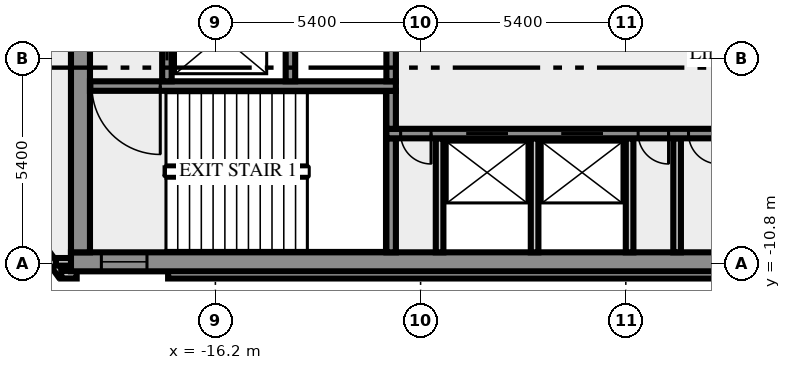
"""IFC4 building model, lengths in metres.
Left out: names, types, materials, properties, quantities, classifications, styles, units other than length and angle.
Written with IfcOpenShell. Run it as: python <this file> out.ifc"""

import sys

from ifc_helpers import new_model, si_unit, direction, frame, frame_2d, origin, place, context, subcontext, project, spatial, rectangle, extrude, element, fill, save


model = new_model("IFC4")
c1 = context("Model", 3, precision=1e-05, world=origin(), true_north=direction((0.0, 1.0)))
c2 = subcontext(c1, "Body", "Model", "MODEL_VIEW")
j1 = project(units=[si_unit("LENGTHUNIT", "METRE"), si_unit("PLANEANGLEUNIT", "RADIAN")], contexts=[c1])
p1 = place(None, origin())
s1 = spatial("IfcSite", under=j1, at=p1, CompositionType="ELEMENT")
p2 = place(p1, origin())
s2 = spatial("IfcBuilding", under=s1, at=p2, CompositionType="ELEMENT")
p3 = place(p2, frame((0.0, 0.0, 311.0)))
s3 = spatial("IfcBuildingStorey", under=s2, at=p3, CompositionType="ELEMENT", Elevation=311.0)
p4 = place(p3, frame((-21.833, -8.909, 0.0), z_axis=(0.0, 0.0, 1.0), x_axis=(0.587766567315, -0.809030569476, 0.0)))
e1 = element("IfcWall", 1, at=p4, inside=s3, PredefinedType="SOLIDWALL", context=c2, shape_type="SweptSolid", body=[
    extrude(rectangle(XDim=2.688, YDim=0.2, at=frame_2d((1.344, 0.0))), origin(), (0.0, 0.0, 1.0), 3.65),
])
p5 = place(p3, frame((-20.256, -11.088, 0.0), z_axis=(0.0, 0.0, 1.0), x_axis=(1.0, 0.0, 0.0)))
e2 = element("IfcWall", 2, at=p5, inside=s3, PredefinedType="SOLIDWALL", context=c2, shape_type="SweptSolid", body=[
    extrude(rectangle(XDim=0.406, YDim=0.2, at=frame_2d((0.203, 0.0))), origin(), (0.0, 0.0, 1.0), 3.65),
])
p6 = place(p3, frame((-17.444, -11.088, 0.0), z_axis=(0.0, 0.0, 1.0), x_axis=(1.0, 0.0, 0.0)))
e3 = element("IfcWall", 3, at=p6, inside=s3, PredefinedType="SOLIDWALL", context=c2, shape_type="SweptSolid", body=[
    extrude(rectangle(XDim=34.888, YDim=0.2, at=frame_2d((17.444, 0.0))), origin(), (0.0, 0.0, 1.0), 3.65),
])
p7 = place(p3, frame((-19.98, -10.75, 0.0), z_axis=(0.0, 0.0, 1.0), x_axis=(-1.0, 0.0, 0.0)))
e4 = element("IfcWall", 4, at=p7, inside=s3, PredefinedType="SOLIDWALL", context=c2, shape_type="SweptSolid", body=[
    extrude(rectangle(XDim=0.417, YDim=0.2, at=frame_2d((0.208, 0.0))), origin(), (0.0, 0.0, 1.0), 3.65),
])
p8 = place(p3, frame((-20.0, -10.75, 0.0), z_axis=(0.0, 0.0, 1.0), x_axis=(1.0, 0.0, 0.0)))
e5 = element("IfcWall", 5, at=p8, inside=s3, PredefinedType="SHEAR", context=c2, shape_type="SweptSolid", body=[
    extrude(rectangle(XDim=40.0, YDim=0.5, at=frame_2d((20.0, 0.0))), origin(), (0.0, 0.0, 1.0), 3.65),
])
p9 = place(p8, frame((0.8, 0.0, 1.0)))
e6 = element("IfcOpeningElement", 6, at=p9, cuts=e5, PredefinedType="OPENING", context=c2, shape_type="SweptSolid", body=[
    extrude(rectangle(XDim=1.2, YDim=1.2, at=frame_2d((0.6, 0.6))), frame((0.0, 0.26, 0.0), z_axis=(0.0, -1.0, 0.0), x_axis=(1.0, 0.0, 0.0)), (0.0, 0.0, 1.0), 0.52),
])
p10 = place(p8, frame((38.0, 0.0, 1.0)))
e7 = element("IfcOpeningElement", 7, at=p10, cuts=e5, PredefinedType="OPENING", context=c2, shape_type="SweptSolid", body=[
    extrude(rectangle(XDim=1.2, YDim=1.2, at=frame_2d((0.6, 0.6))), frame((0.0, 0.26, 0.0), z_axis=(0.0, -1.0, 0.0), x_axis=(1.0, 0.0, 0.0)), (0.0, 0.0, 1.0), 0.52),
])
p11 = place(p3, frame((-19.75, -10.5, 0.0), z_axis=(0.0, 0.0, 1.0), x_axis=(0.0, 1.0, 0.0)))
e8 = element("IfcWall", 8, at=p11, inside=s3, PredefinedType="SHEAR", context=c2, shape_type="SweptSolid", body=[
    extrude(rectangle(XDim=8.8, YDim=0.5, at=frame_2d((4.4, 0.0))), origin(), (0.0, 0.0, 1.0), 3.65),
])
p12 = place(p3, frame((-11.575, -10.5, 0.0), z_axis=(0.0, 0.0, 1.0), x_axis=(0.0, 1.0, 0.0)))
e9 = element("IfcWall", 9, at=p12, inside=s3, PredefinedType="SHEAR", context=c2, shape_type="SweptSolid", body=[
    extrude(rectangle(XDim=3.0, YDim=0.25, at=frame_2d((1.5, 0.0))), origin(), (0.0, 0.0, 1.0), 3.65),
])
for number, where, z_axis, x_axis in (
    (10, (-10.3, -10.5, 0.0), (0.0, 0.0, 1.0), (0.0, 1.0, 0.0)),
    (11, (-7.8, -10.5, 0.0), (0.0, 0.0, 1.0), (0.0, 1.0, 0.0)),
    (12, (-5.3, -10.5, 0.0), (0.0, 0.0, 1.0), (0.0, 1.0, 0.0)),
    (13, (-4.05, -10.5, 0.0), (0.0, 0.0, 1.0), (0.0, 1.0, 0.0)),
):
    element("IfcWall", number, at=place(p3, frame(where, z_axis=z_axis, x_axis=x_axis)), inside=s3, PredefinedType="SOLIDWALL", context=c2, shape_type="SweptSolid", body=[
        extrude(rectangle(XDim=3.0, YDim=0.2, at=frame_2d((1.5, 0.0))), origin(), (0.0, 0.0, 1.0), 3.65),
    ])
p13 = place(p3, frame((11.7, -7.375, 0.0), z_axis=(0.0, 0.0, 1.0), x_axis=(-1.0, 0.0, 0.0)))
e14 = element("IfcWall", 14, at=p13, inside=s3, PredefinedType="SHEAR", context=c2, shape_type="SweptSolid", body=[
    extrude(rectangle(XDim=23.4, YDim=0.25, at=frame_2d((11.7, 0.0))), origin(), (0.0, 0.0, 1.0), 3.65),
])
p14 = place(p13, frame((22.225, 0.0, 0.0)))
e15 = element("IfcOpeningElement", 15, at=p14, cuts=e14, PredefinedType="OPENING", context=c2, shape_type="SweptSolid", body=[
    extrude(rectangle(XDim=0.8, YDim=2.1, at=frame_2d((0.4, 1.05))), frame((0.0, 0.135, 0.0), z_axis=(0.0, -1.0, 0.0), x_axis=(1.0, 0.0, 0.0)), (0.0, 0.0, 1.0), 0.27),
])
p15 = place(p13, frame((20.2, 0.0, 0.0)))
e16 = element("IfcOpeningElement", 16, at=p15, cuts=e14, PredefinedType="OPENING", context=c2, shape_type="SweptSolid", body=[
    extrude(rectangle(XDim=1.1, YDim=2.1, at=frame_2d((0.55, 1.05))), frame((0.0, 0.135, 0.0), z_axis=(0.0, -1.0, 0.0), x_axis=(1.0, 0.0, 0.0)), (0.0, 0.0, 1.0), 0.27),
])
p16 = place(p13, frame((17.7, 0.0, 0.0)))
e17 = element("IfcOpeningElement", 17, at=p16, cuts=e14, PredefinedType="OPENING", context=c2, shape_type="SweptSolid", body=[
    extrude(rectangle(XDim=1.1, YDim=2.1, at=frame_2d((0.55, 1.05))), frame((0.0, 0.135, 0.0), z_axis=(0.0, -1.0, 0.0), x_axis=(1.0, 0.0, 0.0)), (0.0, 0.0, 1.0), 0.27),
])
p17 = place(p13, frame((15.975, 0.0, 0.0)))
e18 = element("IfcOpeningElement", 18, at=p17, cuts=e14, PredefinedType="OPENING", context=c2, shape_type="SweptSolid", body=[
    extrude(rectangle(XDim=0.8, YDim=2.1, at=frame_2d((0.4, 1.05))), frame((0.0, 0.135, 0.0), z_axis=(0.0, -1.0, 0.0), x_axis=(1.0, 0.0, 0.0)), (0.0, 0.0, 1.0), 0.27),
])
p18 = place(p13, frame((14.65, 0.0, 0.0)))
e19 = element("IfcOpeningElement", 19, at=p18, cuts=e14, PredefinedType="OPENING", context=c2, shape_type="SweptSolid", body=[
    extrude(rectangle(XDim=0.8, YDim=2.1, at=frame_2d((0.4, 1.05))), frame((0.0, 0.135, 0.0), z_axis=(0.0, -1.0, 0.0), x_axis=(1.0, 0.0, 0.0)), (0.0, 0.0, 1.0), 0.27),
])
p19 = place(p13, frame((12.8, 0.0, 0.0)))
e20 = element("IfcOpeningElement", 20, at=p19, cuts=e14, PredefinedType="OPENING", context=c2, shape_type="SweptSolid", body=[
    extrude(rectangle(XDim=0.9, YDim=2.1, at=frame_2d((0.45, 1.05))), frame((0.0, 0.135, 0.0), z_axis=(0.0, -1.0, 0.0), x_axis=(1.0, 0.0, 0.0)), (0.0, 0.0, 1.0), 0.27),
])
p20 = place(p13, frame((10.7, 0.0, 0.0)))
e21 = element("IfcOpeningElement", 21, at=p20, cuts=e14, PredefinedType="OPENING", context=c2, shape_type="SweptSolid", body=[
    extrude(rectangle(XDim=0.9, YDim=2.1, at=frame_2d((0.45, 1.05))), frame((0.0, 0.135, 0.0), z_axis=(0.0, -1.0, 0.0), x_axis=(1.0, 0.0, 0.0)), (0.0, 0.0, 1.0), 0.27),
])
p21 = place(p13, frame((6.237, 0.0, 0.0)))
e22 = element("IfcOpeningElement", 22, at=p21, cuts=e14, PredefinedType="OPENING", context=c2, shape_type="SweptSolid", body=[
    extrude(rectangle(XDim=0.9, YDim=2.1, at=frame_2d((0.45, 1.05))), frame((0.0, 0.135, 0.0), z_axis=(0.0, -1.0, 0.0), x_axis=(1.0, 0.0, 0.0)), (0.0, 0.0, 1.0), 0.27),
])
p22 = place(p13, frame((1.263, 0.0, 0.0)))
e23 = element("IfcOpeningElement", 23, at=p22, cuts=e14, PredefinedType="OPENING", context=c2, shape_type="SweptSolid", body=[
    extrude(rectangle(XDim=0.9, YDim=2.1, at=frame_2d((0.45, 1.05))), frame((0.0, 0.135, 0.0), z_axis=(0.0, -1.0, 0.0), x_axis=(1.0, 0.0, 0.0)), (0.0, 0.0, 1.0), 0.27),
])
p23 = place(p3, frame((-11.575, -7.25, 0.0), z_axis=(0.0, 0.0, 1.0), x_axis=(0.0, 1.0, 0.0)))
e24 = element("IfcWall", 24, at=p23, inside=s3, PredefinedType="SHEAR", context=c2, shape_type="SweptSolid", body=[
    extrude(rectangle(XDim=1.0, YDim=0.25, at=frame_2d((0.5, 0.0))), origin(), (0.0, 0.0, 1.0), 3.65),
])
p24 = place(p3, frame((-11.45, -6.125, 0.0), z_axis=(0.0, 0.0, 1.0), x_axis=(-1.0, 0.0, 0.0)))
e25 = element("IfcWall", 25, at=p24, inside=s3, PredefinedType="SHEAR", context=c2, shape_type="SweptSolid", body=[
    extrude(rectangle(XDim=8.05, YDim=0.25, at=frame_2d((4.025, 0.0))), origin(), (0.0, 0.0, 1.0), 3.65),
])
p25 = place(p24, frame((6.2, 0.0, 0.0)))
e26 = element("IfcOpeningElement", 26, at=p25, cuts=e25, PredefinedType="OPENING", context=c2, shape_type="SweptSolid", body=[
    extrude(rectangle(XDim=1.8, YDim=2.1, at=frame_2d((0.9, 1.05))), frame((0.0, 0.135, 0.0), z_axis=(0.0, -1.0, 0.0), x_axis=(1.0, 0.0, 0.0)), (0.0, 0.0, 1.0), 0.27),
])
p26 = place(p3, frame((-17.475, -6.0, 0.0), z_axis=(0.0, 0.0, 1.0), x_axis=(0.0, 1.0, 0.0)))
e27 = element("IfcWall", 27, at=p26, inside=s3, PredefinedType="SHEAR", context=c2, shape_type="SweptSolid", body=[
    extrude(rectangle(XDim=4.3, YDim=0.25, at=frame_2d((2.15, 0.0))), origin(), (0.0, 0.0, 1.0), 3.65),
])
p27 = place(p26, frame((0.55, 0.0, 0.0)))
e28 = element("IfcOpeningElement", 28, at=p27, cuts=e27, PredefinedType="OPENING", context=c2, shape_type="SweptSolid", body=[
    extrude(rectangle(XDim=1.3, YDim=2.1, at=frame_2d((0.65, 1.05))), frame((0.0, 0.135, 0.0), z_axis=(0.0, -1.0, 0.0), x_axis=(1.0, 0.0, 0.0)), (0.0, 0.0, 1.0), 0.27),
])
for number, where, z_axis, x_axis in (
    (29, (-14.225, -6.0, 0.0), (0.0, 0.0, 1.0), (0.0, 1.0, 0.0)),
    (30, (-11.575, -6.0, 0.0), (0.0, 0.0, 1.0), (0.0, 1.0, 0.0)),
):
    element("IfcWall", number, at=place(p3, frame(where, z_axis=z_axis, x_axis=x_axis)), inside=s3, PredefinedType="SHEAR", context=c2, shape_type="SweptSolid", body=[
        extrude(rectangle(XDim=1.75, YDim=0.25, at=frame_2d((0.875, 0.0))), origin(), (0.0, 0.0, 1.0), 3.65),
    ])
p28 = place(p9, origin())
e31 = element("IfcWindow", 31, at=p28, inside=s3, PartitioningType="SINGLE_PANEL", PredefinedType="WINDOW", context=c2, shape_type="SweptSolid", body=[
    extrude(rectangle(XDim=1.2, YDim=1.2, at=frame_2d((0.6, 0.6))), frame((0.0, 0.03, 0.0), z_axis=(0.0, -1.0, 0.0), x_axis=(1.0, 0.0, 0.0)), (0.0, 0.0, 1.0), 0.06),
])
fill(e6, e31)
p29 = place(p14, origin())
e32 = element("IfcDoor", 32, at=p29, inside=s3, OperationType="SINGLE_SWING_RIGHT", PredefinedType="DOOR", context=c2, shape_type="SweptSolid", body=[
    extrude(rectangle(XDim=0.8, YDim=2.1, at=frame_2d((0.4, 1.05))), frame((0.0, 0.025, 0.0), z_axis=(0.0, -1.0, 0.0), x_axis=(1.0, 0.0, 0.0)), (0.0, 0.0, 1.0), 0.05),
])
fill(e15, e32)
p30 = place(p15, origin())
e33 = element("IfcDoor", 33, at=p30, inside=s3, OperationType="DOUBLE_DOOR_SLIDING", PredefinedType="DOOR", context=c2, shape_type="SweptSolid", body=[
    extrude(rectangle(XDim=1.1, YDim=2.1, at=frame_2d((0.55, 1.05))), frame((0.0, 0.025, 0.0), z_axis=(0.0, -1.0, 0.0), x_axis=(1.0, 0.0, 0.0)), (0.0, 0.0, 1.0), 0.05),
])
fill(e16, e33)
p31 = place(p16, origin())
e34 = element("IfcDoor", 34, at=p31, inside=s3, OperationType="DOUBLE_DOOR_SLIDING", PredefinedType="DOOR", context=c2, shape_type="SweptSolid", body=[
    extrude(rectangle(XDim=1.1, YDim=2.1, at=frame_2d((0.55, 1.05))), frame((0.0, 0.025, 0.0), z_axis=(0.0, -1.0, 0.0), x_axis=(1.0, 0.0, 0.0)), (0.0, 0.0, 1.0), 0.05),
])
fill(e17, e34)
p32 = place(p17, origin())
e35 = element("IfcDoor", 35, at=p32, inside=s3, OperationType="SINGLE_SWING_RIGHT", PredefinedType="DOOR", context=c2, shape_type="SweptSolid", body=[
    extrude(rectangle(XDim=0.8, YDim=2.1, at=frame_2d((0.4, 1.05))), frame((0.0, 0.025, 0.0), z_axis=(0.0, -1.0, 0.0), x_axis=(1.0, 0.0, 0.0)), (0.0, 0.0, 1.0), 0.05),
])
fill(e18, e35)
p33 = place(p18, origin())
e36 = element("IfcDoor", 36, at=p33, inside=s3, OperationType="SINGLE_SWING_RIGHT", PredefinedType="DOOR", context=c2, shape_type="SweptSolid", body=[
    extrude(rectangle(XDim=0.8, YDim=2.1, at=frame_2d((0.4, 1.05))), frame((0.0, 0.025, 0.0), z_axis=(0.0, -1.0, 0.0), x_axis=(1.0, 0.0, 0.0)), (0.0, 0.0, 1.0), 0.05),
])
fill(e19, e36)
p34 = place(p25, origin())
e37 = element("IfcDoor", 37, at=p34, inside=s3, OperationType="DOUBLE_DOOR_SINGLE_SWING", PredefinedType="DOOR", context=c2, shape_type="SweptSolid", body=[
    extrude(rectangle(XDim=1.8, YDim=2.1, at=frame_2d((0.9, 1.05))), frame((0.0, 0.025, 0.0), z_axis=(0.0, -1.0, 0.0), x_axis=(1.0, 0.0, 0.0)), (0.0, 0.0, 1.0), 0.05),
])
fill(e26, e37)
p35 = place(p27, origin())
e38 = element("IfcDoor", 38, at=p35, inside=s3, OperationType="DOUBLE_DOOR_SLIDING", PredefinedType="DOOR", context=c2, shape_type="SweptSolid", body=[
    extrude(rectangle(XDim=1.3, YDim=2.1, at=frame_2d((0.65, 1.05))), frame((0.0, 0.025, 0.0), z_axis=(0.0, -1.0, 0.0), x_axis=(1.0, 0.0, 0.0)), (0.0, 0.0, 1.0), 0.05),
])
fill(e28, e38)
save(model, sys.argv[1])
